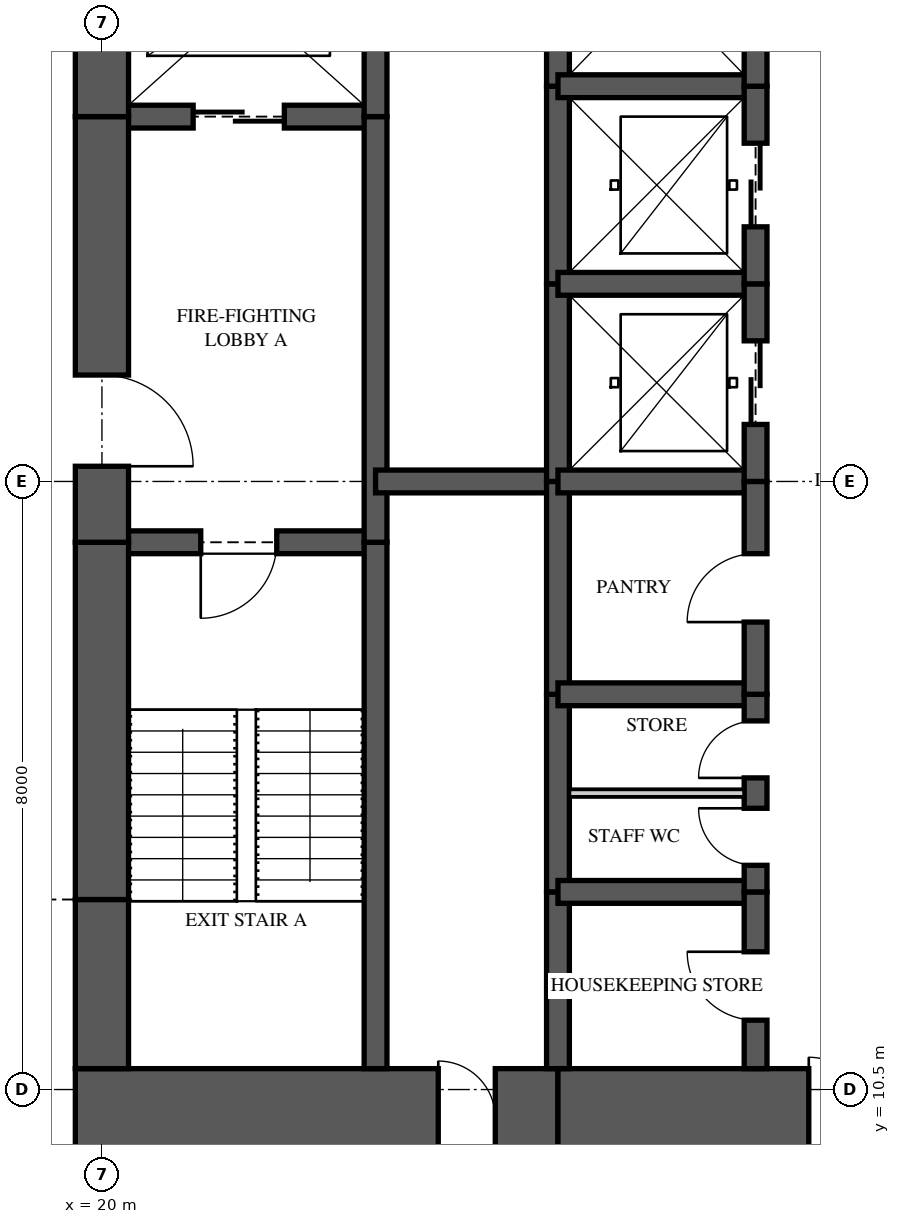
"""IFC4 building model, lengths in metres.
Left out: names, types, materials, properties, quantities, classifications, styles, units other than length and angle.
Written with IfcOpenShell. Run it as: python <this file> out.ifc"""

import sys

from ifc_helpers import new_model, si_unit, direction, frame, frame_2d, origin, place, context, subcontext, project, spatial, rectangle, extrude, element, fill, save


model = new_model("IFC4")
c1 = context("Model", 3, precision=1e-05, world=origin(), true_north=direction((0.0, 1.0)))
c2 = subcontext(c1, "Body", "Model", "MODEL_VIEW")
j1 = project(units=[si_unit("LENGTHUNIT", "METRE"), si_unit("PLANEANGLEUNIT", "RADIAN")], contexts=[c1])
p1 = place(None, origin())
s1 = spatial("IfcSite", under=j1, at=p1, CompositionType="ELEMENT")
p2 = place(p1, origin())
s2 = spatial("IfcBuilding", under=s1, at=p2, CompositionType="ELEMENT")
p3 = place(p2, frame((0.0, 0.0, 181.15)))
s3 = spatial("IfcBuildingStorey", under=s2, at=p3, CompositionType="ELEMENT", Elevation=181.15)
p4 = place(p3, frame((19.65, 10.125, 0.0), z_axis=(0.0, 0.0, 1.0), x_axis=(1.0, 0.0, 0.0)))
e1 = element("IfcWall", 1, at=p4, inside=s3, PredefinedType="SHEAR", context=c2, shape_type="SweptSolid", body=[
    extrude(rectangle(XDim=6.35, YDim=1.3, at=frame_2d((3.175, 0.0))), origin(), (0.0, 0.0, 1.0), 3.35),
])
p5 = place(p4, frame((4.775, 0.0, 0.0)))
e2 = element("IfcOpeningElement", 2, at=p5, cuts=e1, PredefinedType="OPENING", context=c2, shape_type="SweptSolid", body=[
    extrude(rectangle(XDim=0.75, YDim=2.1, at=frame_2d((0.375, 1.05))), frame((0.0, 0.66, 0.0), z_axis=(0.0, -1.0, 0.0), x_axis=(1.0, 0.0, 0.0)), (0.0, 0.0, 1.0), 1.32),
])
p6 = place(p3, frame((26.0, 10.125, 0.0), z_axis=(0.0, 0.0, 1.0), x_axis=(1.0, 0.0, 0.0)))
e3 = element("IfcWall", 3, at=p6, inside=s3, PredefinedType="SHEAR", context=c2, shape_type="SweptSolid", body=[
    extrude(rectangle(XDim=5.6, YDim=1.3, at=frame_2d((2.8, 0.0))), origin(), (0.0, 0.0, 1.0), 3.35),
])
p7 = place(p6, frame((3.3, 0.0, 0.0)))
e4 = element("IfcOpeningElement", 4, at=p7, cuts=e3, PredefinedType="OPENING", context=c2, shape_type="SweptSolid", body=[
    extrude(rectangle(XDim=1.6, YDim=2.1, at=frame_2d((0.8, 1.05))), frame((0.0, 0.66, 0.0), z_axis=(0.0, -1.0, 0.0), x_axis=(1.0, 0.0, 0.0)), (0.0, 0.0, 1.0), 1.32),
])
p8 = place(p3, frame((20.0, 26.225, 0.0), z_axis=(0.0, 0.0, 1.0), x_axis=(0.0, -1.0, 0.0)))
e5 = element("IfcWall", 5, at=p8, inside=s3, PredefinedType="SHEAR", context=c2, shape_type="SweptSolid", body=[
    extrude(rectangle(XDim=2.925, YDim=0.7, at=frame_2d((1.462, 0.0))), origin(), (0.0, 0.0, 1.0), 3.35),
])
p9 = place(p3, frame((20.0, 23.3, 0.0), z_axis=(0.0, 0.0, 1.0), x_axis=(0.0, -1.0, 0.0)))
e6 = element("IfcWall", 6, at=p9, inside=s3, PredefinedType="SHEAR", context=c2, shape_type="SweptSolid", body=[
    extrude(rectangle(XDim=5.6, YDim=0.7, at=frame_2d((2.8, 0.0))), origin(), (0.0, 0.0, 1.0), 3.35),
])
p10 = place(p9, frame((3.4, 0.0, 0.0)))
e7 = element("IfcOpeningElement", 7, at=p10, cuts=e6, PredefinedType="OPENING", context=c2, shape_type="SweptSolid", body=[
    extrude(rectangle(XDim=1.2, YDim=2.2, at=frame_2d((0.6, 1.1))), frame((0.0, 0.36, 0.0), z_axis=(0.0, -1.0, 0.0), x_axis=(1.0, 0.0, 0.0)), (0.0, 0.0, 1.0), 0.72),
])
p11 = place(p3, frame((20.0, 17.7, 0.0), z_axis=(0.0, 0.0, 1.0), x_axis=(0.0, -1.0, 0.0)))
e8 = element("IfcWall", 8, at=p11, inside=s3, PredefinedType="SHEAR", context=c2, shape_type="SweptSolid", body=[
    extrude(rectangle(XDim=4.7, YDim=0.7, at=frame_2d((2.35, 0.0))), origin(), (0.0, 0.0, 1.0), 3.35),
])
p12 = place(p3, frame((20.0, 13.0, 0.0), z_axis=(0.0, 0.0, 1.0), x_axis=(0.0, -1.0, 0.0)))
e9 = element("IfcWall", 9, at=p12, inside=s3, PredefinedType="SHEAR", context=c2, shape_type="SweptSolid", body=[
    extrude(rectangle(XDim=2.225, YDim=0.7, at=frame_2d((1.113, 0.0))), origin(), (0.0, 0.0, 1.0), 3.35),
])
p13 = place(p3, frame((23.6, 10.775, 0.0), z_axis=(0.0, 0.0, 1.0), x_axis=(0.0, 1.0, 0.0)))
e10 = element("IfcWall", 10, at=p13, inside=s3, PredefinedType="SHEAR", context=c2, shape_type="SweptSolid", body=[
    extrude(rectangle(XDim=6.925, YDim=0.3, at=frame_2d((3.462, 0.0))), origin(), (0.0, 0.0, 1.0), 3.35),
])
p14 = place(p3, frame((23.6, 17.7, 0.0), z_axis=(0.0, 0.0, 1.0), x_axis=(0.0, 1.0, 0.0)))
e11 = element("IfcWall", 11, at=p14, inside=s3, PredefinedType="SHEAR", context=c2, shape_type="SweptSolid", body=[
    extrude(rectangle(XDim=5.6, YDim=0.3, at=frame_2d((2.8, 0.0))), origin(), (0.0, 0.0, 1.0), 3.35),
])
p15 = place(p3, frame((23.6, 23.3, 0.0), z_axis=(0.0, 0.0, 1.0), x_axis=(0.0, 1.0, 0.0)))
e12 = element("IfcWall", 12, at=p15, inside=s3, PredefinedType="SHEAR", context=c2, shape_type="SweptSolid", body=[
    extrude(rectangle(XDim=2.925, YDim=0.3, at=frame_2d((1.462, 0.0))), origin(), (0.0, 0.0, 1.0), 3.35),
])
p16 = place(p3, frame((26.0, 10.775, 0.0), z_axis=(0.0, 0.0, 1.0), x_axis=(0.0, 1.0, 0.0)))
e13 = element("IfcWall", 13, at=p16, inside=s3, PredefinedType="SHEAR", context=c2, shape_type="SweptSolid", body=[
    extrude(rectangle(XDim=2.325, YDim=0.3, at=frame_2d((1.163, 0.0))), origin(), (0.0, 0.0, 1.0), 3.35),
])
p17 = place(p3, frame((26.0, 13.1, 0.0), z_axis=(0.0, 0.0, 1.0), x_axis=(0.0, 1.0, 0.0)))
e14 = element("IfcWall", 14, at=p17, inside=s3, PredefinedType="SHEAR", context=c2, shape_type="SweptSolid", body=[
    extrude(rectangle(XDim=2.6, YDim=0.3, at=frame_2d((1.3, 0.0))), origin(), (0.0, 0.0, 1.0), 3.35),
])
p18 = place(p3, frame((26.0, 15.7, 0.0), z_axis=(0.0, 0.0, 1.0), x_axis=(0.0, 1.0, 0.0)))
e15 = element("IfcWall", 15, at=p18, inside=s3, PredefinedType="SHEAR", context=c2, shape_type="SweptSolid", body=[
    extrude(rectangle(XDim=2.8, YDim=0.3, at=frame_2d((1.4, 0.0))), origin(), (0.0, 0.0, 1.0), 3.35),
])
p19 = place(p3, frame((26.0, 18.5, 0.0), z_axis=(0.0, 0.0, 1.0), x_axis=(0.0, 1.0, 0.0)))
e16 = element("IfcWall", 16, at=p19, inside=s3, PredefinedType="SHEAR", context=c2, shape_type="SweptSolid", body=[
    extrude(rectangle(XDim=2.6, YDim=0.3, at=frame_2d((1.3, 0.0))), origin(), (0.0, 0.0, 1.0), 3.35),
])
p20 = place(p3, frame((26.0, 21.1, 0.0), z_axis=(0.0, 0.0, 1.0), x_axis=(0.0, 1.0, 0.0)))
e17 = element("IfcWall", 17, at=p20, inside=s3, PredefinedType="SHEAR", context=c2, shape_type="SweptSolid", body=[
    extrude(rectangle(XDim=2.6, YDim=0.3, at=frame_2d((1.3, 0.0))), origin(), (0.0, 0.0, 1.0), 3.35),
])
p21 = place(p3, frame((26.0, 23.7, 0.0), z_axis=(0.0, 0.0, 1.0), x_axis=(0.0, 1.0, 0.0)))
e18 = element("IfcWall", 18, at=p21, inside=s3, PredefinedType="SHEAR", context=c2, shape_type="SweptSolid", body=[
    extrude(rectangle(XDim=2.525, YDim=0.3, at=frame_2d((1.263, 0.0))), origin(), (0.0, 0.0, 1.0), 3.35),
])
p22 = place(p3, frame((28.6, 10.775, 0.0), z_axis=(0.0, 0.0, 1.0), x_axis=(0.0, 1.0, 0.0)))
e19 = element("IfcWall", 19, at=p22, inside=s3, PredefinedType="SHEAR", context=c2, shape_type="SweptSolid", body=[
    extrude(rectangle(XDim=2.325, YDim=0.3, at=frame_2d((1.163, 0.0))), origin(), (0.0, 0.0, 1.0), 3.35),
])
p23 = place(p22, frame((0.637, 0.0, 0.0)))
e20 = element("IfcOpeningElement", 20, at=p23, cuts=e19, PredefinedType="OPENING", context=c2, shape_type="SweptSolid", body=[
    extrude(rectangle(XDim=0.9, YDim=2.1, at=frame_2d((0.45, 1.05))), frame((0.0, 0.16, 0.0), z_axis=(0.0, -1.0, 0.0), x_axis=(1.0, 0.0, 0.0)), (0.0, 0.0, 1.0), 0.32),
])
p24 = place(p3, frame((28.6, 13.1, 0.0), z_axis=(0.0, 0.0, 1.0), x_axis=(0.0, 1.0, 0.0)))
e21 = element("IfcWall", 21, at=p24, inside=s3, PredefinedType="SHEAR", context=c2, shape_type="SweptSolid", body=[
    extrude(rectangle(XDim=2.6, YDim=0.3, at=frame_2d((1.3, 0.0))), origin(), (0.0, 0.0, 1.0), 3.35),
])
p25 = place(p24, frame((0.35, 0.0, 0.0)))
e22 = element("IfcOpeningElement", 22, at=p25, cuts=e21, PredefinedType="OPENING", context=c2, shape_type="SweptSolid", body=[
    extrude(rectangle(XDim=0.75, YDim=2.1, at=frame_2d((0.375, 1.05))), frame((0.0, 0.16, 0.0), z_axis=(0.0, -1.0, 0.0), x_axis=(1.0, 0.0, 0.0)), (0.0, 0.0, 1.0), 0.32),
])
p26 = place(p24, frame((1.5, 0.0, 0.0)))
e23 = element("IfcOpeningElement", 23, at=p26, cuts=e21, PredefinedType="OPENING", context=c2, shape_type="SweptSolid", body=[
    extrude(rectangle(XDim=0.75, YDim=2.1, at=frame_2d((0.375, 1.05))), frame((0.0, 0.16, 0.0), z_axis=(0.0, -1.0, 0.0), x_axis=(1.0, 0.0, 0.0)), (0.0, 0.0, 1.0), 0.32),
])
p27 = place(p3, frame((28.6, 15.7, 0.0), z_axis=(0.0, 0.0, 1.0), x_axis=(0.0, 1.0, 0.0)))
e24 = element("IfcWall", 24, at=p27, inside=s3, PredefinedType="SHEAR", context=c2, shape_type="SweptSolid", body=[
    extrude(rectangle(XDim=2.8, YDim=0.3, at=frame_2d((1.4, 0.0))), origin(), (0.0, 0.0, 1.0), 3.35),
])
p28 = place(p27, frame((0.95, 0.0, 0.0)))
e25 = element("IfcOpeningElement", 25, at=p28, cuts=e24, PredefinedType="OPENING", context=c2, shape_type="SweptSolid", body=[
    extrude(rectangle(XDim=0.9, YDim=2.1, at=frame_2d((0.45, 1.05))), frame((0.0, 0.16, 0.0), z_axis=(0.0, -1.0, 0.0), x_axis=(1.0, 0.0, 0.0)), (0.0, 0.0, 1.0), 0.32),
])
p29 = place(p3, frame((28.6, 18.5, 0.0), z_axis=(0.0, 0.0, 1.0), x_axis=(0.0, 1.0, 0.0)))
e26 = element("IfcWall", 26, at=p29, inside=s3, PredefinedType="SHEAR", context=c2, shape_type="SweptSolid", body=[
    extrude(rectangle(XDim=2.6, YDim=0.3, at=frame_2d((1.3, 0.0))), origin(), (0.0, 0.0, 1.0), 3.35),
])
p30 = place(p29, frame((0.75, 0.0, 0.0)))
e27 = element("IfcOpeningElement", 27, at=p30, cuts=e26, PredefinedType="OPENING", context=c2, shape_type="SweptSolid", body=[
    extrude(rectangle(XDim=1.1, YDim=2.1, at=frame_2d((0.55, 1.05))), frame((0.0, 0.16, 0.0), z_axis=(0.0, -1.0, 0.0), x_axis=(1.0, 0.0, 0.0)), (0.0, 0.0, 1.0), 0.32),
])
p31 = place(p3, frame((28.6, 21.1, 0.0), z_axis=(0.0, 0.0, 1.0), x_axis=(0.0, 1.0, 0.0)))
e28 = element("IfcWall", 28, at=p31, inside=s3, PredefinedType="SHEAR", context=c2, shape_type="SweptSolid", body=[
    extrude(rectangle(XDim=2.6, YDim=0.3, at=frame_2d((1.3, 0.0))), origin(), (0.0, 0.0, 1.0), 3.35),
])
p32 = place(p31, frame((0.75, 0.0, 0.0)))
e29 = element("IfcOpeningElement", 29, at=p32, cuts=e28, PredefinedType="OPENING", context=c2, shape_type="SweptSolid", body=[
    extrude(rectangle(XDim=1.1, YDim=2.1, at=frame_2d((0.55, 1.05))), frame((0.0, 0.16, 0.0), z_axis=(0.0, -1.0, 0.0), x_axis=(1.0, 0.0, 0.0)), (0.0, 0.0, 1.0), 0.32),
])
p33 = place(p3, frame((28.6, 23.7, 0.0), z_axis=(0.0, 0.0, 1.0), x_axis=(0.0, 1.0, 0.0)))
e30 = element("IfcWall", 30, at=p33, inside=s3, PredefinedType="SHEAR", context=c2, shape_type="SweptSolid", body=[
    extrude(rectangle(XDim=2.525, YDim=0.3, at=frame_2d((1.263, 0.0))), origin(), (0.0, 0.0, 1.0), 3.35),
])
p34 = place(p33, frame((0.85, 0.0, 0.0)))
e31 = element("IfcOpeningElement", 31, at=p34, cuts=e30, PredefinedType="OPENING", context=c2, shape_type="SweptSolid", body=[
    extrude(rectangle(XDim=1.1, YDim=2.1, at=frame_2d((0.55, 1.05))), frame((0.0, 0.16, 0.0), z_axis=(0.0, -1.0, 0.0), x_axis=(1.0, 0.0, 0.0)), (0.0, 0.0, 1.0), 0.32),
])
p35 = place(p3, frame((20.0, 17.7, 0.0), z_axis=(0.0, 0.0, 1.0), x_axis=(1.0, 0.0, 0.0)))
e32 = element("IfcWall", 32, at=p35, inside=s3, PredefinedType="SHEAR", context=c2, shape_type="SweptSolid", body=[
    extrude(rectangle(XDim=3.6, YDim=0.3, at=frame_2d((1.8, 0.0))), origin(), (0.0, 0.0, 1.0), 3.35),
])
p36 = place(p35, frame((1.3, 0.0, 0.0)))
e33 = element("IfcOpeningElement", 33, at=p36, cuts=e32, PredefinedType="OPENING", context=c2, shape_type="SweptSolid", body=[
    extrude(rectangle(XDim=1.0, YDim=2.1, at=frame_2d((0.5, 1.05))), frame((0.0, 0.16, 0.0), z_axis=(0.0, -1.0, 0.0), x_axis=(1.0, 0.0, 0.0)), (0.0, 0.0, 1.0), 0.32),
])
p37 = place(p3, frame((20.0, 23.3, 0.0), z_axis=(0.0, 0.0, 1.0), x_axis=(1.0, 0.0, 0.0)))
e34 = element("IfcWall", 34, at=p37, inside=s3, PredefinedType="SHEAR", context=c2, shape_type="SweptSolid", body=[
    extrude(rectangle(XDim=3.6, YDim=0.3, at=frame_2d((1.8, 0.0))), origin(), (0.0, 0.0, 1.0), 3.35),
])
p38 = place(p37, frame((1.2, 0.0, 0.0)))
e35 = element("IfcOpeningElement", 35, at=p38, cuts=e34, PredefinedType="OPENING", context=c2, shape_type="SweptSolid", body=[
    extrude(rectangle(XDim=1.2, YDim=2.1, at=frame_2d((0.6, 1.05))), frame((0.0, 0.16, 0.0), z_axis=(0.0, -1.0, 0.0), x_axis=(1.0, 0.0, 0.0)), (0.0, 0.0, 1.0), 0.32),
])
p39 = place(p3, frame((23.6, 18.5, 0.0), z_axis=(0.0, 0.0, 1.0), x_axis=(1.0, 0.0, 0.0)))
e36 = element("IfcWall", 36, at=p39, inside=s3, PredefinedType="SHEAR", context=c2, shape_type="SweptSolid", body=[
    extrude(rectangle(XDim=2.4, YDim=0.3, at=frame_2d((1.2, 0.0))), origin(), (0.0, 0.0, 1.0), 3.35),
])
for number, where, z_axis, x_axis in (
    (37, (26.0, 13.1, 0.0), (0.0, 0.0, 1.0), (1.0, 0.0, 0.0)),
    (38, (26.0, 15.7, 0.0), (0.0, 0.0, 1.0), (1.0, 0.0, 0.0)),
    (39, (26.0, 18.5, 0.0), (0.0, 0.0, 1.0), (1.0, 0.0, 0.0)),
    (40, (26.0, 21.1, 0.0), (0.0, 0.0, 1.0), (1.0, 0.0, 0.0)),
    (41, (26.0, 23.7, 0.0), (0.0, 0.0, 1.0), (1.0, 0.0, 0.0)),
):
    element("IfcWall", number, at=place(p3, frame(where, z_axis=z_axis, x_axis=x_axis)), inside=s3, PredefinedType="SHEAR", context=c2, shape_type="SweptSolid", body=[
        extrude(rectangle(XDim=2.6, YDim=0.3, at=frame_2d((1.3, 0.0))), origin(), (0.0, 0.0, 1.0), 3.35),
    ])
p40 = place(p3, frame((26.15, 14.4, 0.0), z_axis=(0.0, 0.0, 1.0), x_axis=(1.0, 0.0, 0.0)))
e42 = element("IfcWall", 42, at=p40, inside=s3, PredefinedType="PARTITIONING", context=c2, shape_type="SweptSolid", body=[
    extrude(rectangle(XDim=2.3, YDim=0.1, at=frame_2d((1.15, 0.0))), origin(), (0.0, 0.0, 1.0), 3.11),
])
p41 = place(p36, frame((1.0, 0.0, 0.0), z_axis=(0.0, 0.0, 1.0), x_axis=(-1.0, 0.0, 0.0)))
e43 = element("IfcDoor", 43, at=p41, inside=s3, OperationType="SINGLE_SWING_RIGHT", PredefinedType="DOOR", context=c2, shape_type="SweptSolid", body=[
    extrude(rectangle(XDim=1.0, YDim=2.1, at=frame_2d((0.5, 1.05))), frame((0.0, 0.025, 0.0), z_axis=(0.0, -1.0, 0.0), x_axis=(1.0, 0.0, 0.0)), (0.0, 0.0, 1.0), 0.05),
])
fill(e33, e43)
p42 = place(p10, origin())
e44 = element("IfcDoor", 44, at=p42, inside=s3, OperationType="SINGLE_SWING_RIGHT", PredefinedType="DOOR", context=c2, shape_type="SweptSolid", body=[
    extrude(rectangle(XDim=1.2, YDim=2.2, at=frame_2d((0.6, 1.1))), frame((0.0, 0.025, 0.0), z_axis=(0.0, -1.0, 0.0), x_axis=(1.0, 0.0, 0.0)), (0.0, 0.0, 1.0), 0.05),
])
fill(e7, e44)
p43 = place(p38, origin())
e45 = element("IfcDoor", 45, at=p43, inside=s3, OperationType="SLIDING_TO_LEFT", PredefinedType="DOOR", context=c2, shape_type="SweptSolid", body=[
    extrude(rectangle(XDim=1.2, YDim=2.1, at=frame_2d((0.6, 1.05))), frame((0.0, 0.025, 0.0), z_axis=(0.0, -1.0, 0.0), x_axis=(1.0, 0.0, 0.0)), (0.0, 0.0, 1.0), 0.05),
])
fill(e35, e45)
p44 = place(p30, origin())
e46 = element("IfcDoor", 46, at=p44, inside=s3, OperationType="SLIDING_TO_LEFT", PredefinedType="DOOR", context=c2, shape_type="SweptSolid", body=[
    extrude(rectangle(XDim=1.1, YDim=2.1, at=frame_2d((0.55, 1.05))), frame((0.0, 0.025, 0.0), z_axis=(0.0, -1.0, 0.0), x_axis=(1.0, 0.0, 0.0)), (0.0, 0.0, 1.0), 0.05),
])
fill(e27, e46)
p45 = place(p32, origin())
e47 = element("IfcDoor", 47, at=p45, inside=s3, OperationType="SLIDING_TO_LEFT", PredefinedType="DOOR", context=c2, shape_type="SweptSolid", body=[
    extrude(rectangle(XDim=1.1, YDim=2.1, at=frame_2d((0.55, 1.05))), frame((0.0, 0.025, 0.0), z_axis=(0.0, -1.0, 0.0), x_axis=(1.0, 0.0, 0.0)), (0.0, 0.0, 1.0), 0.05),
])
fill(e29, e47)
p46 = place(p23, origin())
e48 = element("IfcDoor", 48, at=p46, inside=s3, OperationType="SINGLE_SWING_RIGHT", PredefinedType="DOOR", context=c2, shape_type="SweptSolid", body=[
    extrude(rectangle(XDim=0.9, YDim=2.1, at=frame_2d((0.45, 1.05))), frame((0.0, 0.025, 0.0), z_axis=(0.0, -1.0, 0.0), x_axis=(1.0, 0.0, 0.0)), (0.0, 0.0, 1.0), 0.05),
])
fill(e20, e48)
p47 = place(p25, origin())
e49 = element("IfcDoor", 49, at=p47, inside=s3, OperationType="SINGLE_SWING_RIGHT", PredefinedType="DOOR", context=c2, shape_type="SweptSolid", body=[
    extrude(rectangle(XDim=0.75, YDim=2.1, at=frame_2d((0.375, 1.05))), frame((0.0, 0.025, 0.0), z_axis=(0.0, -1.0, 0.0), x_axis=(1.0, 0.0, 0.0)), (0.0, 0.0, 1.0), 0.05),
])
fill(e22, e49)
p48 = place(p26, origin())
e50 = element("IfcDoor", 50, at=p48, inside=s3, OperationType="SINGLE_SWING_LEFT", PredefinedType="DOOR", context=c2, shape_type="SweptSolid", body=[
    extrude(rectangle(XDim=0.75, YDim=2.1, at=frame_2d((0.375, 1.05))), frame((0.0, 0.025, 0.0), z_axis=(0.0, -1.0, 0.0), x_axis=(1.0, 0.0, 0.0)), (0.0, 0.0, 1.0), 0.05),
])
fill(e23, e50)
p49 = place(p28, origin())
e51 = element("IfcDoor", 51, at=p49, inside=s3, OperationType="SINGLE_SWING_LEFT", PredefinedType="DOOR", context=c2, shape_type="SweptSolid", body=[
    extrude(rectangle(XDim=0.9, YDim=2.1, at=frame_2d((0.45, 1.05))), frame((0.0, 0.025, 0.0), z_axis=(0.0, -1.0, 0.0), x_axis=(1.0, 0.0, 0.0)), (0.0, 0.0, 1.0), 0.05),
])
fill(e25, e51)
p50 = place(p7, origin())
e52 = element("IfcDoor", 52, at=p50, inside=s3, OperationType="DOUBLE_DOOR_SINGLE_SWING", PredefinedType="DOOR", context=c2, shape_type="SweptSolid", body=[
    extrude(rectangle(XDim=1.6, YDim=2.1, at=frame_2d((0.8, 1.05))), frame((0.0, 0.025, 0.0), z_axis=(0.0, -1.0, 0.0), x_axis=(1.0, 0.0, 0.0)), (0.0, 0.0, 1.0), 0.05),
])
fill(e4, e52)
p51 = place(p5, origin())
e53 = element("IfcDoor", 53, at=p51, inside=s3, OperationType="SINGLE_SWING_LEFT", PredefinedType="DOOR", context=c2, shape_type="SweptSolid", body=[
    extrude(rectangle(XDim=0.75, YDim=2.1, at=frame_2d((0.375, 1.05))), frame((0.0, 0.025, 0.0), z_axis=(0.0, -1.0, 0.0), x_axis=(1.0, 0.0, 0.0)), (0.0, 0.0, 1.0), 0.05),
])
fill(e2, e53)
save(model, sys.argv[1])
